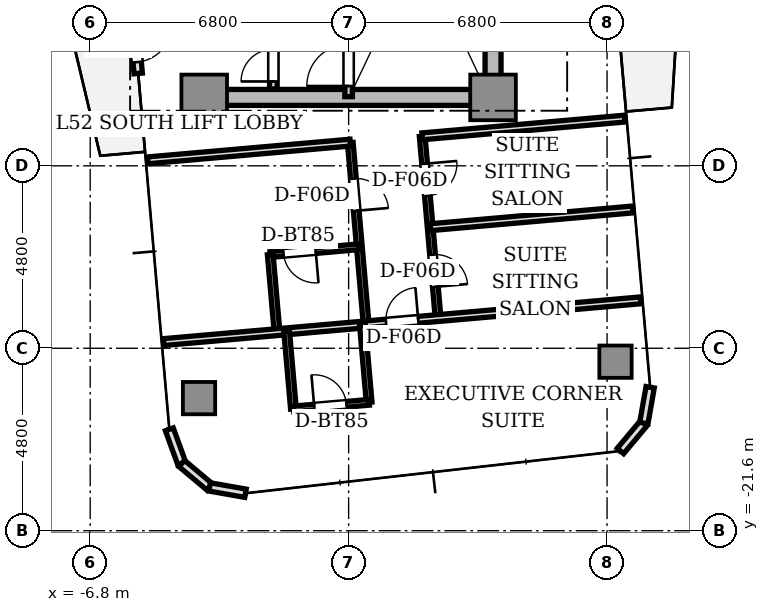
"""IFC4 building model, lengths in metres.
Left out: names, types, materials, properties, quantities, classifications, styles, units other than length and angle.
Written with IfcOpenShell. Run it as: python <this file> out.ifc"""

import sys

from ifc_helpers import new_model, si_unit, direction, frame, frame_2d, origin, origin_2d, place, context, subcontext, project, spatial, rectangle, extrude, source, transform, mapped, element, fill, save


model = new_model("IFC4")
c1 = context("Model", 3, precision=1e-05, world=origin(), true_north=direction((0.0, 1.0)))
c2 = subcontext(c1, "Body", "Model", "MODEL_VIEW")
j1 = project(units=[si_unit("LENGTHUNIT", "METRE"), si_unit("PLANEANGLEUNIT", "RADIAN")], contexts=[c1])
p1 = place(None, origin())
s1 = spatial("IfcSite", under=j1, at=p1, CompositionType="ELEMENT")
p2 = place(p1, origin())
s2 = spatial("IfcBuilding", under=s1, at=p2, CompositionType="ELEMENT")
p3 = place(p2, frame((0.0, 0.0, 188.6)))
s3 = spatial("IfcBuildingStorey", under=s2, at=p3, CompositionType="ELEMENT", Elevation=188.6)
p4 = place(p3, frame((-3.55, -10.2, 0.0), z_axis=(0.0, 0.0, 1.0), x_axis=(1.0, 0.0, 0.0)))
e1 = element("IfcWall", 1, at=p4, inside=s3, PredefinedType="SHEAR", context=c2, shape_type="SweptSolid", body=[
    extrude(rectangle(XDim=7.1, YDim=0.42, at=frame_2d((3.55, 0.0))), origin(), (0.0, 0.0, 1.0), 3.11),
])
p5 = place(p3, frame((3.8, -9.75, 0.0), z_axis=(0.0, 0.0, 1.0), x_axis=(0.0, 1.0, 0.0)))
e2 = element("IfcWall", 2, at=p5, inside=s3, PredefinedType="SHEAR", context=c2, shape_type="SweptSolid", body=[
    extrude(rectangle(XDim=6.9, YDim=0.42, at=frame_2d((3.45, 0.0))), origin(), (0.0, 0.0, 1.0), 3.11),
])
m1 = source(origin(), c2, "Body", "SweptSolid", [
    extrude(rectangle(XDim=1.2, YDim=1.2, at=origin_2d()), origin(), (0.0, 0.0, 1.0), 3.11),
])
for number, where, z_axis, x_axis in (
    (3, (-3.8, -10.2, 0.0), (0.0, 0.0, 1.0), (1.0, 0.0, 0.0)),
    (4, (3.8, -10.2, 0.0), (0.0, 0.0, 1.0), (1.0, 0.0, 0.0)),
):
    element("IfcColumn", number, at=place(p3, frame(where, z_axis=z_axis, x_axis=x_axis)), inside=s3, PredefinedType="COLUMN", context=c2, shape_type="MappedRepresentation", body=[
        mapped(m1, transform((0.0, 0.0, 0.0), scale=1.0)),
    ])
m2 = source(origin(), c2, "Body", "SweptSolid", [
    extrude(rectangle(XDim=0.85, YDim=0.85, at=origin_2d()), origin(), (0.0, 0.0, 1.0), 3.11),
])
for number, where, z_axis, x_axis in (
    (5, (-3.936, -18.112, 0.0), (0.0, 0.0, 1.0), (1.0, 0.0, 0.0)),
    (6, (7.022, -17.153, 0.0), (0.0, 0.0, 1.0), (1.0, 0.0, 0.0)),
):
    element("IfcColumn", number, at=place(p3, frame(where, z_axis=z_axis, x_axis=x_axis)), inside=s3, PredefinedType="COLUMN", context=c2, shape_type="MappedRepresentation", body=[
        mapped(m2, transform((0.0, 0.0, 0.0), scale=1.0)),
    ])
p6 = place(p3, frame((-5.772, -6.879, 0.0), z_axis=(0.0, 0.0, 1.0), x_axis=(0.087168071984, -0.996193619346, 0.0)))
e7 = element("IfcWall", 7, at=p6, inside=s3, PredefinedType="STANDARD", context=c2, shape_type="SweptSolid", body=[
    extrude(rectangle(XDim=2.7, YDim=0.22, at=frame_2d((1.35, 0.0))), origin(), (0.0, 0.0, 1.0), 3.11),
])
p7 = place(p6, frame((1.4, 0.0, 0.0)))
e8 = element("IfcOpeningElement", 8, at=p7, cuts=e7, PredefinedType="OPENING", context=c2, shape_type="SweptSolid", body=[
    extrude(rectangle(XDim=1.0, YDim=2.2, at=frame_2d((0.5, 1.1))), frame((0.0, 0.12, 0.0), z_axis=(0.0, -1.0, 0.0), x_axis=(1.0, 0.0, 0.0)), (0.0, 0.0, 1.0), 0.24),
])
p8 = place(p3, frame((-4.718, -18.933, 0.0), z_axis=(0.0, 0.0, 1.0), x_axis=(0.34188635151, -0.939741306239, 0.0)))
e9 = element("IfcWall", 9, at=p8, inside=s3, PredefinedType="STANDARD", context=c2, shape_type="SweptSolid", body=[
    extrude(rectangle(XDim=0.958, YDim=0.22, at=frame_2d((0.479, 0.0))), origin(), (0.0, 0.0, 1.0), 3.11),
])
for number, where, z_axis, x_axis in (
    (10, (-4.39, -19.833, 0.0), (0.0, 0.0, 1.0), (0.766, -0.643, 0.0)),
    (11, (-3.657, -20.449, 0.0), (0.0, 0.0, 1.0), (0.985, -0.174, 0.0)),
):
    element("IfcWall", number, at=place(p3, frame(where, z_axis=z_axis, x_axis=x_axis)), inside=s3, PredefinedType="STANDARD", context=c2, shape_type="SweptSolid", body=[
        extrude(rectangle(XDim=0.958, YDim=0.22, at=frame_2d((0.479, 0.0))), origin(), (0.0, 0.0, 1.0), 3.11),
    ])
for number, where, z_axis, x_axis in (
    (12, (7.152, -19.503, 0.0), (0.0, 0.0, 1.0), (0.643, 0.766, 0.0)),
    (13, (7.768, -18.769, 0.0), (0.0, 0.0, 1.0), (0.174, 0.985, 0.0)),
):
    element("IfcWall", number, at=place(p3, frame(where, z_axis=z_axis, x_axis=x_axis)), inside=s3, PredefinedType="STANDARD", context=c2, shape_type="SweptSolid", body=[
        extrude(rectangle(XDim=0.958, YDim=0.22, at=frame_2d((0.479, 0.0))), origin(), (0.0, 0.0, 1.0), 3.11),
    ])
p9 = place(p3, frame((0.0, -10.18, 0.0), z_axis=(0.0, 0.0, 1.0), x_axis=(0.0, 1.0, 0.0)))
e14 = element("IfcWall", 14, at=p9, inside=s3, PredefinedType="SOLIDWALL", context=c2, shape_type="SweptSolid", body=[
    extrude(rectangle(XDim=7.68, YDim=0.2, at=frame_2d((3.84, 0.0))), origin(), (0.0, 0.0, 1.0), 3.11),
])
p10 = place(p9, frame((0.28, 0.0, 0.0)))
e15 = element("IfcOpeningElement", 15, at=p10, cuts=e14, PredefinedType="OPENING", context=c2, shape_type="SweptSolid", body=[
    extrude(rectangle(XDim=1.1, YDim=2.15, at=frame_2d((0.55, 1.075))), frame((0.0, 0.11, 0.0), z_axis=(0.0, -1.0, 0.0), x_axis=(1.0, 0.0, 0.0)), (0.0, 0.0, 1.0), 0.22),
])
p11 = place(p3, frame((-1.98, -9.98, 0.0), z_axis=(0.0, 0.0, 1.0), x_axis=(0.0, 1.0, 0.0)))
e16 = element("IfcWall", 16, at=p11, inside=s3, PredefinedType="SOLIDWALL", context=c2, shape_type="SweptSolid", body=[
    extrude(rectangle(XDim=4.66, YDim=0.2, at=frame_2d((2.33, 0.0))), origin(), (0.0, 0.0, 1.0), 2.66),
])
p12 = place(p11, frame((0.2, 0.0, 0.0)))
e17 = element("IfcOpeningElement", 17, at=p12, cuts=e16, PredefinedType="OPENING", context=c2, shape_type="SweptSolid", body=[
    extrude(rectangle(XDim=0.85, YDim=2.1, at=frame_2d((0.425, 1.05))), frame((0.0, 0.11, 0.0), z_axis=(0.0, -1.0, 0.0), x_axis=(1.0, 0.0, 0.0)), (0.0, 0.0, 1.0), 0.22),
])
p13 = place(p3, frame((1.936, -11.224, 0.0), z_axis=(0.0, 0.0, 1.0), x_axis=(0.087182724829, -0.996192337097, 0.0)))
e18 = element("IfcWall", 18, at=p13, inside=s3, PredefinedType="PARTITIONING", context=c2, shape_type="SweptSolid", body=[
    extrude(rectangle(XDim=4.8, YDim=0.15, at=frame_2d((2.4, 0.0))), origin(), (0.0, 0.0, 1.0), 2.66),
])
p14 = place(p13, frame((0.725, 0.0, 0.0)))
e19 = element("IfcOpeningElement", 19, at=p14, cuts=e18, PredefinedType="OPENING", context=c2, shape_type="SweptSolid", body=[
    extrude(rectangle(XDim=0.85, YDim=2.1, at=frame_2d((0.425, 1.05))), frame((0.0, 0.085, 0.0), z_axis=(0.0, -1.0, 0.0), x_axis=(1.0, 0.0, 0.0)), (0.0, 0.0, 1.0), 0.17),
])
p15 = place(p13, frame((3.125, 0.0, 0.0)))
e20 = element("IfcOpeningElement", 20, at=p15, cuts=e18, PredefinedType="OPENING", context=c2, shape_type="SweptSolid", body=[
    extrude(rectangle(XDim=0.85, YDim=2.1, at=frame_2d((0.425, 1.05))), frame((0.0, 0.085, 0.0), z_axis=(0.0, -1.0, 0.0), x_axis=(1.0, 0.0, 0.0)), (0.0, 0.0, 1.0), 0.17),
])
p16 = place(p3, frame((0.043, -11.39, 0.0), z_axis=(0.0, 0.0, 1.0), x_axis=(0.087178307383, -0.996192723684, 0.0)))
e21 = element("IfcWall", 21, at=p16, inside=s3, PredefinedType="PARTITIONING", context=c2, shape_type="SweptSolid", body=[
    extrude(rectangle(XDim=4.8, YDim=0.15, at=frame_2d((2.4, 0.0))), origin(), (0.0, 0.0, 1.0), 2.66),
])
p17 = place(p16, frame((0.95, 0.0, 0.0)))
e22 = element("IfcOpeningElement", 22, at=p17, cuts=e21, PredefinedType="OPENING", context=c2, shape_type="SweptSolid", body=[
    extrude(rectangle(XDim=0.85, YDim=2.1, at=frame_2d((0.425, 1.05))), frame((0.0, 0.085, 0.0), z_axis=(0.0, -1.0, 0.0), x_axis=(1.0, 0.0, 0.0)), (0.0, 0.0, 1.0), 0.17),
])
for number, where, z_axis, x_axis in (
    (23, (1.936, -11.224, 0.0), (0.0, 0.0, 1.0), (0.996, 0.087, 0.0)),
    (24, (-5.287, -11.856, 0.0), (0.0, 0.0, 1.0), (0.996, 0.087, 0.0)),
    (25, (2.145, -13.615, 0.0), (0.0, 0.0, 1.0), (0.996, 0.087, 0.0)),
):
    element("IfcWall", number, at=place(p3, frame(where, z_axis=z_axis, x_axis=x_axis)), inside=s3, PredefinedType="PARTITIONING", context=c2, shape_type="SweptSolid", body=[
        extrude(rectangle(XDim=5.35, YDim=0.18, at=frame_2d((2.675, 0.0))), origin(), (0.0, 0.0, 1.0), 2.66),
    ])
p18 = place(p3, frame((0.282, -14.129, 0.0), z_axis=(0.0, 0.0, 1.0), x_axis=(-0.996197656711, -0.087121918963, 0.0)))
e26 = element("IfcWall", 26, at=p18, inside=s3, PredefinedType="PARTITIONING", context=c2, shape_type="SweptSolid", body=[
    extrude(rectangle(XDim=2.354, YDim=0.15, at=frame_2d((1.177, 0.0))), origin(), (0.0, 0.0, 1.0), 2.66),
])
p19 = place(p18, frame((1.154, 0.0, 0.0)))
e27 = element("IfcOpeningElement", 27, at=p19, cuts=e26, PredefinedType="OPENING", context=c2, shape_type="SweptSolid", body=[
    extrude(rectangle(XDim=0.85, YDim=2.1, at=frame_2d((0.425, 1.05))), frame((0.0, 0.085, 0.0), z_axis=(0.0, -1.0, 0.0), x_axis=(1.0, 0.0, 0.0)), (0.0, 0.0, 1.0), 0.17),
])
p20 = place(p3, frame((-2.062, -14.334, 0.0), z_axis=(0.0, 0.0, 1.0), x_axis=(0.087174336889, -0.99619307114, 0.0)))
e28 = element("IfcWall", 28, at=p20, inside=s3, PredefinedType="PARTITIONING", context=c2, shape_type="SweptSolid", body=[
    extrude(rectangle(XDim=2.05, YDim=0.15, at=frame_2d((1.025, 0.0))), origin(), (0.0, 0.0, 1.0), 2.66),
])
p21 = place(p3, frame((-4.868, -16.638, 0.0), z_axis=(0.0, 0.0, 1.0), x_axis=(0.996194790044, 0.087154691724, 0.0)))
e29 = element("IfcWall", 29, at=p21, inside=s3, PredefinedType="PARTITIONING", context=c2, shape_type="SweptSolid", body=[
    extrude(rectangle(XDim=12.6, YDim=0.18, at=frame_2d((6.3, 0.0))), origin(), (0.0, 0.0, 1.0), 2.66),
])
p22 = place(p21, frame((5.875, 0.0, 0.0)))
e30 = element("IfcOpeningElement", 30, at=p22, cuts=e29, PredefinedType="OPENING", context=c2, shape_type="SweptSolid", body=[
    extrude(rectangle(XDim=0.85, YDim=2.1, at=frame_2d((0.425, 1.05))), frame((0.0, 0.1, 0.0), z_axis=(0.0, -1.0, 0.0), x_axis=(1.0, 0.0, 0.0)), (0.0, 0.0, 1.0), 0.2),
])
p23 = place(p3, frame((0.362, -16.18, 0.0), z_axis=(0.0, 0.0, 1.0), x_axis=(0.087174336889, -0.99619307114, 0.0)))
e31 = element("IfcWall", 31, at=p23, inside=s3, PredefinedType="PARTITIONING", context=c2, shape_type="SweptSolid", body=[
    extrude(rectangle(XDim=2.05, YDim=0.15, at=frame_2d((1.025, 0.0))), origin(), (0.0, 0.0, 1.0), 2.66),
])
p24 = place(p3, frame((-1.631, -16.354, 0.0), z_axis=(0.0, 0.0, 1.0), x_axis=(0.087184680235, -0.996192165966, 0.0)))
e32 = element("IfcWall", 32, at=p24, inside=s3, PredefinedType="PARTITIONING", context=c2, shape_type="SweptSolid", body=[
    extrude(rectangle(XDim=2.05, YDim=0.15, at=frame_2d((1.025, 0.0))), origin(), (0.0, 0.0, 1.0), 2.66),
])
p25 = place(p3, frame((-1.452, -18.396, 0.0), z_axis=(0.0, 0.0, 1.0), x_axis=(0.996205236158, 0.087035208109, 0.0)))
e33 = element("IfcWall", 33, at=p25, inside=s3, PredefinedType="PARTITIONING", context=c2, shape_type="SweptSolid", body=[
    extrude(rectangle(XDim=2.0, YDim=0.15, at=frame_2d((1.0, 0.0))), origin(), (0.0, 0.0, 1.0), 2.66),
])
p26 = place(p25, frame((0.55, 0.0, 0.0)))
e34 = element("IfcOpeningElement", 34, at=p26, cuts=e33, PredefinedType="OPENING", context=c2, shape_type="SweptSolid", body=[
    extrude(rectangle(XDim=0.85, YDim=2.1, at=frame_2d((0.425, 1.05))), frame((0.0, 0.085, 0.0), z_axis=(0.0, -1.0, 0.0), x_axis=(1.0, 0.0, 0.0)), (0.0, 0.0, 1.0), 0.17),
])
m3 = source(origin(), c2, "Body", "SweptSolid", [
    extrude(rectangle(XDim=1.0, YDim=0.05, at=origin_2d()), origin(), (0.0, 0.0, 1.0), 2.2),
])
p27 = place(p7, frame((0.5, 0.0, 0.0)))
e35 = element("IfcDoor", 35, at=p27, inside=s3, OperationType="SINGLE_SWING_LEFT", PredefinedType="DOOR", context=c2, shape_type="MappedRepresentation", body=[
    mapped(m3, transform((0.0, 0.0, 0.0), scale=1.0)),
])
fill(e8, e35)
m4 = source(origin(), c2, "Body", "SweptSolid", [
    extrude(rectangle(XDim=1.1, YDim=0.05, at=origin_2d()), origin(), (0.0, 0.0, 1.0), 2.15),
])
p28 = place(p10, frame((0.55, 0.0, 0.0)))
e36 = element("IfcDoor", 36, at=p28, inside=s3, OperationType="SINGLE_SWING_LEFT", PredefinedType="DOOR", context=c2, shape_type="MappedRepresentation", body=[
    mapped(m4, transform((0.0, 0.0, 0.0), scale=1.0)),
])
fill(e15, e36)
m5 = source(origin(), c2, "Body", "SweptSolid", [
    extrude(rectangle(XDim=0.85, YDim=0.05, at=origin_2d()), origin(), (0.0, 0.0, 1.0), 2.1),
])
p29 = place(p12, frame((0.425, 0.0, 0.0)))
e37 = element("IfcDoor", 37, at=p29, inside=s3, OperationType="SINGLE_SWING_LEFT", PredefinedType="DOOR", context=c2, shape_type="MappedRepresentation", body=[
    mapped(m5, transform((0.0, 0.0, 0.0), scale=1.0)),
])
fill(e17, e37)
p30 = place(p14, frame((0.425, 0.0, 0.0)))
e38 = element("IfcDoor", 38, at=p30, inside=s3, OperationType="SINGLE_SWING_LEFT", PredefinedType="DOOR", context=c2, shape_type="MappedRepresentation", body=[
    mapped(m5, transform((0.0, 0.0, 0.0), scale=1.0)),
])
fill(e19, e38)
p31 = place(p15, frame((0.425, 0.0, 0.0)))
e39 = element("IfcDoor", 39, at=p31, inside=s3, OperationType="SINGLE_SWING_RIGHT", PredefinedType="DOOR", context=c2, shape_type="MappedRepresentation", body=[
    mapped(m5, transform((0.0, 0.0, 0.0), scale=1.0)),
])
fill(e20, e39)
p32 = place(p19, frame((0.425, 0.0, 0.0)))
e40 = element("IfcDoor", 40, at=p32, inside=s3, OperationType="SINGLE_SWING_LEFT", PredefinedType="DOOR", context=c2, shape_type="MappedRepresentation", body=[
    mapped(m5, transform((0.0, 0.0, 0.0), scale=1.0)),
])
fill(e27, e40)
p33 = place(p17, frame((0.425, 0.0, 0.0)))
e41 = element("IfcDoor", 41, at=p33, inside=s3, OperationType="SINGLE_SWING_RIGHT", PredefinedType="DOOR", context=c2, shape_type="MappedRepresentation", body=[
    mapped(m5, transform((0.0, 0.0, 0.0), scale=1.0)),
])
fill(e22, e41)
p34 = place(p26, frame((0.425, 0.0, 0.0)))
e42 = element("IfcDoor", 42, at=p34, inside=s3, OperationType="SINGLE_SWING_LEFT", PredefinedType="DOOR", context=c2, shape_type="MappedRepresentation", body=[
    mapped(m5, transform((0.0, 0.0, 0.0), scale=1.0)),
])
fill(e34, e42)
p35 = place(p22, frame((0.425, 0.0, 0.0)))
e43 = element("IfcDoor", 43, at=p35, inside=s3, OperationType="SINGLE_SWING_RIGHT", PredefinedType="DOOR", context=c2, shape_type="MappedRepresentation", body=[
    mapped(m5, transform((0.0, 0.0, 0.0), scale=1.0)),
])
fill(e30, e43)
save(model, sys.argv[1])
